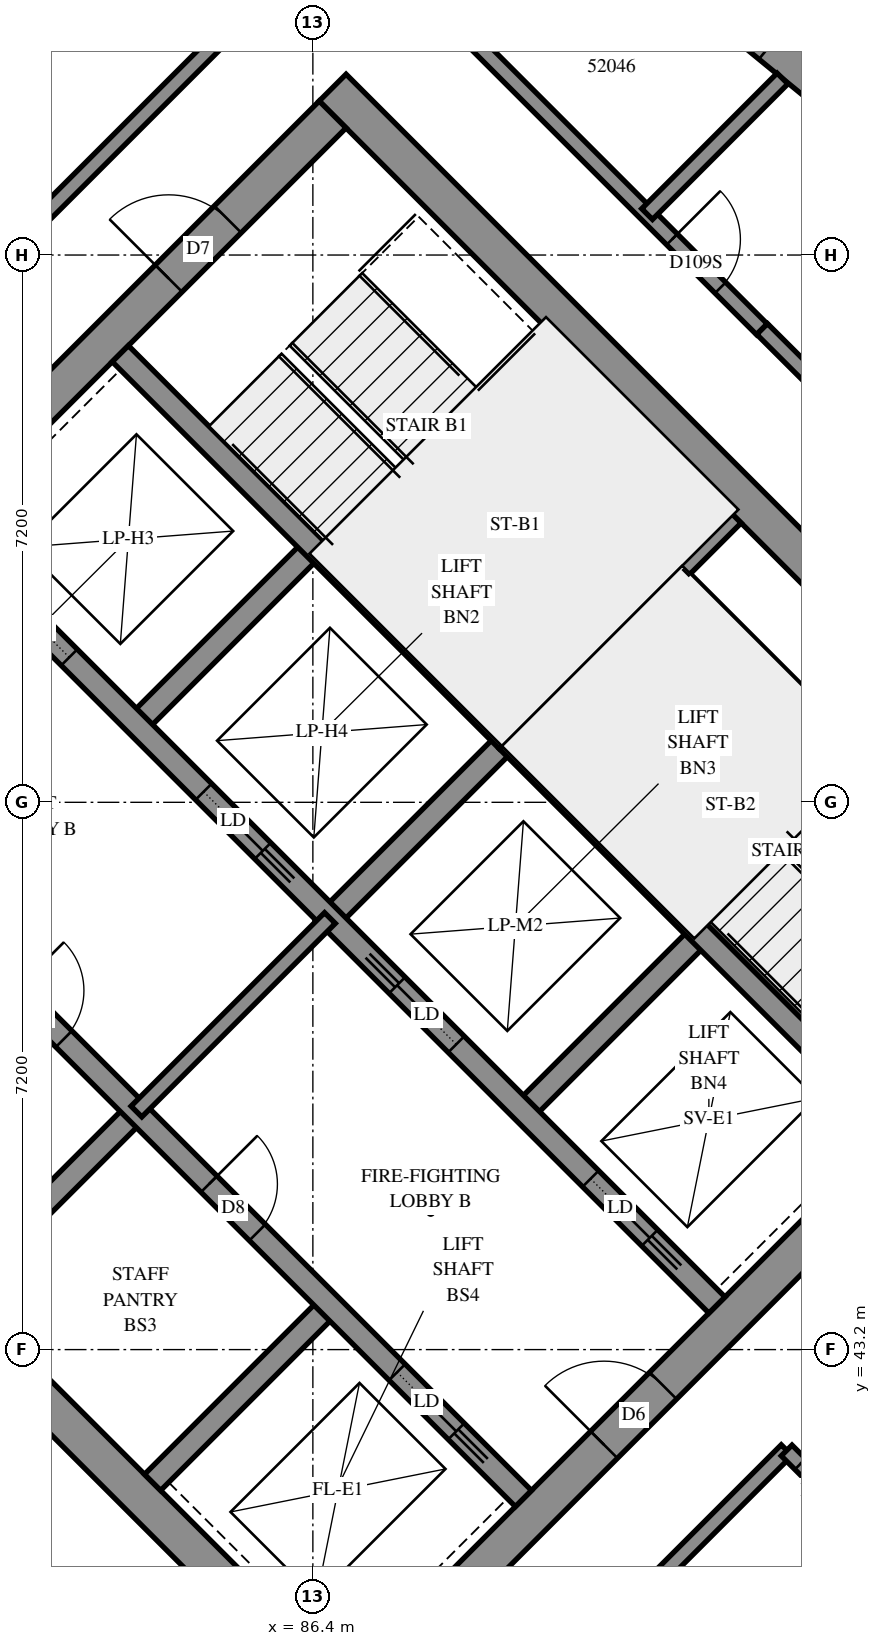
"""IFC4 building model, lengths in metres.
Left out: names, types, materials, properties, quantities, classifications, styles, units other than length and angle.
Written with IfcOpenShell. Run it as: python <this file> out.ifc"""

import sys

from ifc_helpers import new_model, si_unit, direction, frame, frame_2d, origin, place, context, subcontext, project, spatial, polyline, rectangle, outline, extrude, element, fill, save


model = new_model("IFC4")
c1 = context("Model", 3, precision=1e-05, world=origin(), true_north=direction((0.0, 1.0)))
c2 = subcontext(c1, "Body", "Model", "MODEL_VIEW")
j1 = project(units=[si_unit("LENGTHUNIT", "METRE"), si_unit("PLANEANGLEUNIT", "RADIAN")], contexts=[c1])
p1 = place(None, origin())
s1 = spatial("IfcSite", under=j1, at=p1, CompositionType="ELEMENT")
p2 = place(p1, origin())
s2 = spatial("IfcBuilding", under=s1, at=p2, CompositionType="ELEMENT")
p3 = place(p2, frame((0.0, 0.0, 193.0)))
s3 = spatial("IfcBuildingStorey", under=s2, at=p3, CompositionType="ELEMENT", Elevation=193.0)
p4 = place(p3, frame((76.124, 49.267, -0.3), z_axis=(0.0, 0.0, 1.0), x_axis=(0.7071067812, -0.7071067812, 0.0)))
e1 = element("IfcWall", 1, at=p4, inside=s3, PredefinedType="SHEAR", context=c2, shape_type="SweptSolid", body=[
    extrude(rectangle(XDim=15.4, YDim=0.5, at=frame_2d((7.7, 0.0))), origin(), (0.0, 0.0, 1.0), 2.7),
])
p5 = place(p3, frame((86.66, 59.802, -0.3), z_axis=(0.0, 0.0, 1.0), x_axis=(0.7071067812, -0.7071067812, 0.0)))
e2 = element("IfcWall", 2, at=p5, inside=s3, PredefinedType="SHEAR", context=c2, shape_type="SweptSolid", body=[
    extrude(rectangle(XDim=15.4, YDim=0.5, at=frame_2d((7.7, 0.0))), origin(), (0.0, 0.0, 1.0), 2.7),
])
p6 = place(p5, frame((10.5, 0.0, 0.3)))
e3 = element("IfcOpeningElement", 3, at=p6, cuts=e2, PredefinedType="OPENING", context=c2, shape_type="SweptSolid", body=[
    extrude(rectangle(XDim=0.8, YDim=2.1, at=frame_2d((0.4, 1.05))), frame((0.0, 0.26, 0.0), z_axis=(0.0, -1.0, 0.0), x_axis=(1.0, 0.0, 0.0)), (0.0, 0.0, 1.0), 0.52),
])
p7 = place(p3, frame((76.478, 49.267, -0.3), z_axis=(0.0, 0.0, 1.0), x_axis=(0.7071067812, 0.7071067812, 0.0)))
e4 = element("IfcWall", 4, at=p7, inside=s3, PredefinedType="SHEAR", context=c2, shape_type="SweptSolid", body=[
    extrude(rectangle(XDim=14.4, YDim=0.5, at=frame_2d((7.2, 0.0))), origin(), (0.0, 0.0, 1.0), 2.7),
])
p8 = place(p7, frame((4.55, 0.0, 0.3)))
e5 = element("IfcOpeningElement", 5, at=p8, cuts=e4, PredefinedType="OPENING", context=c2, shape_type="SweptSolid", body=[
    extrude(rectangle(XDim=1.1, YDim=2.1, at=frame_2d((0.55, 1.05))), frame((0.0, 0.26, 0.0), z_axis=(0.0, -1.0, 0.0), x_axis=(1.0, 0.0, 0.0)), (0.0, 0.0, 1.0), 0.52),
])
p9 = place(p7, frame((11.35, 0.0, 0.3)))
e6 = element("IfcOpeningElement", 6, at=p9, cuts=e4, PredefinedType="OPENING", context=c2, shape_type="SweptSolid", body=[
    extrude(rectangle(XDim=1.1, YDim=2.1, at=frame_2d((0.55, 1.05))), frame((0.0, 0.26, 0.0), z_axis=(0.0, -1.0, 0.0), x_axis=(1.0, 0.0, 0.0)), (0.0, 0.0, 1.0), 0.52),
])
p10 = place(p3, frame((87.013, 38.731, -0.3), z_axis=(0.0, 0.0, 1.0), x_axis=(0.7071067812, 0.7071067812, 0.0)))
e7 = element("IfcWall", 7, at=p10, inside=s3, PredefinedType="SHEAR", context=c2, shape_type="SweptSolid", body=[
    extrude(rectangle(XDim=14.4, YDim=0.5, at=frame_2d((7.2, 0.0))), origin(), (0.0, 0.0, 1.0), 2.7),
])
p11 = place(p10, frame((4.55, 0.0, 0.3)))
e8 = element("IfcOpeningElement", 8, at=p11, cuts=e7, PredefinedType="OPENING", context=c2, shape_type="SweptSolid", body=[
    extrude(rectangle(XDim=1.1, YDim=2.1, at=frame_2d((0.55, 1.05))), frame((0.0, 0.26, 0.0), z_axis=(0.0, -1.0, 0.0), x_axis=(1.0, 0.0, 0.0)), (0.0, 0.0, 1.0), 0.52),
])
p12 = place(p10, frame((11.35, 0.0, 0.3)))
e9 = element("IfcOpeningElement", 9, at=p12, cuts=e7, PredefinedType="OPENING", context=c2, shape_type="SweptSolid", body=[
    extrude(rectangle(XDim=1.1, YDim=2.1, at=frame_2d((0.55, 1.05))), frame((0.0, 0.26, 0.0), z_axis=(0.0, -1.0, 0.0), x_axis=(1.0, 0.0, 0.0)), (0.0, 0.0, 1.0), 0.52),
])
p13 = place(p3, frame((84.079, 51.423, 0.0), z_axis=(0.0, 0.0, 1.0), x_axis=(0.7071219326, 0.7070916295, 0.0)))
e10 = element("IfcWall", 10, at=p13, inside=s3, PredefinedType="SOLIDWALL", context=c2, shape_type="SweptSolid", body=[
    extrude(rectangle(XDim=3.3, YDim=0.3, at=frame_2d((1.65, 0.0))), origin(), (0.0, 0.0, 1.0), 3.1),
])
p14 = place(p3, frame((81.746, 43.999, 0.0), z_axis=(0.0, 0.0, 1.0), x_axis=(0.7071067812, 0.7071067812, 0.0)))
e11 = element("IfcWall", 11, at=p14, inside=s3, PredefinedType="SOLIDWALL", context=c2, shape_type="SweptSolid", body=[
    extrude(rectangle(XDim=3.3, YDim=0.3, at=frame_2d((1.65, 0.0))), origin(), (0.0, 0.0, 1.0), 3.1),
])
p15 = place(p3, frame((86.625, 48.878, 0.0), z_axis=(0.0, 0.0, 1.0), x_axis=(0.7071067812, 0.7071067812, 0.0)))
e12 = element("IfcWall", 12, at=p15, inside=s3, PredefinedType="SOLIDWALL", context=c2, shape_type="SweptSolid", body=[
    extrude(rectangle(XDim=3.3, YDim=0.3, at=frame_2d((1.65, 0.0))), origin(), (0.0, 0.0, 1.0), 3.1),
])
p16 = place(p3, frame((84.291, 41.453, 0.0), z_axis=(0.0, 0.0, 1.0), x_axis=(0.7071067812, 0.7071067812, 0.0)))
e13 = element("IfcWall", 13, at=p16, inside=s3, PredefinedType="SOLIDWALL", context=c2, shape_type="SweptSolid", body=[
    extrude(rectangle(XDim=3.3, YDim=0.3, at=frame_2d((1.65, 0.0))), origin(), (0.0, 0.0, 1.0), 3.1),
])
p17 = place(p3, frame((89.17, 46.332, 0.0), z_axis=(0.0, 0.0, 1.0), x_axis=(0.7071067812, 0.7071067812, 0.0)))
e14 = element("IfcWall", 14, at=p17, inside=s3, PredefinedType="SOLIDWALL", context=c2, shape_type="SweptSolid", body=[
    extrude(rectangle(XDim=3.3, YDim=0.3, at=frame_2d((1.65, 0.0))), origin(), (0.0, 0.0, 1.0), 3.1),
])
p18 = place(p3, frame((78.988, 51.423, 0.0), z_axis=(0.0, 0.0, 1.0), x_axis=(0.7071067812, -0.7071067812, 0.0)))
e15 = element("IfcWall", 15, at=p18, inside=s3, PredefinedType="SOLIDWALL", context=c2, shape_type="SweptSolid", body=[
    extrude(rectangle(XDim=14.4, YDim=0.3, at=frame_2d((7.2, 0.0))), origin(), (0.0, 0.0, 1.0), 3.1),
])
p19 = place(p18, frame((1.35, 0.0, 0.0)))
e16 = element("IfcOpeningElement", 16, at=p19, cuts=e15, PredefinedType="OPENING", context=c2, shape_type="SweptSolid", body=[
    extrude(rectangle(XDim=0.9, YDim=2.1, at=frame_2d((0.45, 1.05))), frame((0.0, 0.16, 0.0), z_axis=(0.0, -1.0, 0.0), x_axis=(1.0, 0.0, 0.0)), (0.0, 0.0, 1.0), 0.32),
])
p20 = place(p18, frame((4.95, 0.0, 0.0)))
e17 = element("IfcOpeningElement", 17, at=p20, cuts=e15, PredefinedType="OPENING", context=c2, shape_type="SweptSolid", body=[
    extrude(rectangle(XDim=0.9, YDim=2.1, at=frame_2d((0.45, 1.05))), frame((0.0, 0.16, 0.0), z_axis=(0.0, -1.0, 0.0), x_axis=(1.0, 0.0, 0.0)), (0.0, 0.0, 1.0), 0.32),
])
p21 = place(p18, frame((8.55, 0.0, 0.0)))
e18 = element("IfcOpeningElement", 18, at=p21, cuts=e15, PredefinedType="OPENING", context=c2, shape_type="SweptSolid", body=[
    extrude(rectangle(XDim=0.9, YDim=2.1, at=frame_2d((0.45, 1.05))), frame((0.0, 0.16, 0.0), z_axis=(0.0, -1.0, 0.0), x_axis=(1.0, 0.0, 0.0)), (0.0, 0.0, 1.0), 0.32),
])
p22 = place(p18, frame((12.05, 0.0, 0.0)))
e19 = element("IfcOpeningElement", 19, at=p22, cuts=e15, PredefinedType="OPENING", context=c2, shape_type="SweptSolid", body=[
    extrude(rectangle(XDim=1.1, YDim=2.1, at=frame_2d((0.55, 1.05))), frame((0.0, 0.16, 0.0), z_axis=(0.0, -1.0, 0.0), x_axis=(1.0, 0.0, 0.0)), (0.0, 0.0, 1.0), 0.32),
])
p23 = place(p3, frame((81.534, 53.969, 0.0), z_axis=(0.0, 0.0, 1.0), x_axis=(0.707103309, -0.7071102534, 0.0)))
e20 = element("IfcWall", 20, at=p23, inside=s3, PredefinedType="SOLIDWALL", context=c2, shape_type="SweptSolid", body=[
    extrude(rectangle(XDim=14.4, YDim=0.3, at=frame_2d((7.2, 0.0))), origin(), (0.0, 0.0, 1.0), 3.1),
])
p24 = place(p23, frame((1.25, 0.0, 0.0)))
e21 = element("IfcOpeningElement", 21, at=p24, cuts=e20, PredefinedType="OPENING", context=c2, shape_type="SweptSolid", body=[
    extrude(rectangle(XDim=1.1, YDim=2.1, at=frame_2d((0.55, 1.05))), frame((0.0, 0.16, 0.0), z_axis=(0.0, -1.0, 0.0), x_axis=(1.0, 0.0, 0.0)), (0.0, 0.0, 1.0), 0.32),
])
p25 = place(p23, frame((4.85, 0.0, 0.0)))
e22 = element("IfcOpeningElement", 22, at=p25, cuts=e20, PredefinedType="OPENING", context=c2, shape_type="SweptSolid", body=[
    extrude(rectangle(XDim=1.1, YDim=2.1, at=frame_2d((0.55, 1.05))), frame((0.0, 0.16, 0.0), z_axis=(0.0, -1.0, 0.0), x_axis=(1.0, 0.0, 0.0)), (0.0, 0.0, 1.0), 0.32),
])
p26 = place(p23, frame((8.45, 0.0, 0.0)))
e23 = element("IfcOpeningElement", 23, at=p26, cuts=e20, PredefinedType="OPENING", context=c2, shape_type="SweptSolid", body=[
    extrude(rectangle(XDim=1.1, YDim=2.1, at=frame_2d((0.55, 1.05))), frame((0.0, 0.16, 0.0), z_axis=(0.0, -1.0, 0.0), x_axis=(1.0, 0.0, 0.0)), (0.0, 0.0, 1.0), 0.32),
])
p27 = place(p23, frame((12.05, 0.0, 0.0)))
e24 = element("IfcOpeningElement", 24, at=p27, cuts=e20, PredefinedType="OPENING", context=c2, shape_type="SweptSolid", body=[
    extrude(rectangle(XDim=1.1, YDim=2.1, at=frame_2d((0.55, 1.05))), frame((0.0, 0.16, 0.0), z_axis=(0.0, -1.0, 0.0), x_axis=(1.0, 0.0, 0.0)), (0.0, 0.0, 1.0), 0.32),
])
for number, where, z_axis, x_axis in (
    (25, (83.867, 56.302, 0.0), (0.0, 0.0, 1.0), (0.707, -0.707, 0.0)),
    (26, (88.958, 51.211, 0.0), (0.0, 0.0, 1.0), (0.707, -0.707, 0.0)),
):
    element("IfcWall", number, at=place(p3, frame(where, z_axis=z_axis, x_axis=x_axis)), inside=s3, PredefinedType="SOLIDWALL", context=c2, shape_type="SweptSolid", body=[
        extrude(rectangle(XDim=7.2, YDim=0.3, at=frame_2d((3.6, 0.0))), origin(), (0.0, 0.0, 1.0), 3.1),
    ])
p28 = place(p3, frame((88.958, 51.211, 0.0), z_axis=(0.0, 0.0, 1.0), x_axis=(0.7071067812, 0.7071067812, 0.0)))
e27 = element("IfcWall", 27, at=p28, inside=s3, PredefinedType="SOLIDWALL", context=c2, shape_type="SweptSolid", body=[
    extrude(rectangle(XDim=4.2, YDim=0.3, at=frame_2d((2.1, 0.0))), origin(), (0.0, 0.0, 1.0), 3.1),
])
p29 = place(p3, frame((93.601, 59.408, 0.0), z_axis=(0.0, 0.0, 1.0), x_axis=(-0.7734255065, 0.6338872028, 0.0)))
e28 = element("IfcWall", 28, at=p29, inside=s3, PredefinedType="SOLIDWALL", context=c2, shape_type="SweptSolid", body=[
    extrude(outline(polyline([(-0.025, -0.25), (3.32, -0.25), (3.369, 0.25), (0.025, 0.25), (-0.025, -0.25)])), origin(), (0.0, 0.0, 1.0), 3.1),
])
p30 = place(p29, frame((1.518, 0.0, 0.45)))
e29 = element("IfcOpeningElement", 29, at=p30, cuts=e28, PredefinedType="OPENING", context=c2, shape_type="SweptSolid", body=[
    extrude(rectangle(XDim=1.2, YDim=2.5, at=frame_2d((0.6, 1.25))), frame((0.0, 0.26, 0.0), z_axis=(0.0, -1.0, 0.0), x_axis=(1.0, 0.0, 0.0)), (0.0, 0.0, 1.0), 0.52),
])
p31 = place(p3, frame((91.313, 53.354, 0.0), z_axis=(0.0, 0.0, 1.0), x_axis=(0.7071147811, -0.7070987812, 0.0)))
e30 = element("IfcWall", 30, at=p31, inside=s3, PredefinedType="PARTITIONING", context=c2, shape_type="SweptSolid", body=[
    extrude(rectangle(XDim=6.25, YDim=0.15, at=frame_2d((3.125, 0.0))), origin(), (0.0, 0.0, 1.0), 3.1),
])
p32 = place(p3, frame((84.079, 46.332, 0.0), z_axis=(0.0, 0.0, 1.0), x_axis=(0.7071067812, 0.7071067812, 0.0)))
e31 = element("IfcWall", 31, at=p32, inside=s3, PredefinedType="PARTITIONING", context=c2, shape_type="SweptSolid", body=[
    extrude(rectangle(XDim=3.6, YDim=0.2, at=frame_2d((1.8, 0.0))), origin(), (0.0, 0.0, 1.0), 3.1),
])
p33 = place(p3, frame((80.849, 58.377, 0.0), z_axis=(0.0, 0.0, 1.0), x_axis=(0.7071067812, 0.7071067812, 0.0)))
e32 = element("IfcWall", 32, at=p33, inside=s3, PredefinedType="PARTITIONING", context=c2, shape_type="SweptSolid", body=[
    extrude(rectangle(XDim=9.333, YDim=0.2, at=frame_2d((4.666, 0.0))), origin(), (0.0, 0.0, 1.0), 3.1),
])
p34 = place(p3, frame((86.835, 36.079, 0.0), z_axis=(0.0, 0.0, 1.0), x_axis=(0.7071067812, 0.7071067812, 0.0)))
e33 = element("IfcWall", 33, at=p34, inside=s3, PredefinedType="PARTITIONING", context=c2, shape_type="SweptSolid", body=[
    extrude(rectangle(XDim=8.2, YDim=0.2, at=frame_2d((4.1, 0.0))), origin(), (0.0, 0.0, 1.0), 3.1),
])
p35 = place(p3, frame((81.037, 56.303, 0.0), z_axis=(0.0, 0.0, 1.0), x_axis=(0.7071067812, 0.7071067812, 0.0)))
e34 = element("IfcWall", 34, at=p35, inside=s3, PredefinedType="PARTITIONING", context=c2, shape_type="SweptSolid", body=[
    extrude(rectangle(XDim=8.2, YDim=0.2, at=frame_2d((4.1, 0.0))), origin(), (0.0, 0.0, 1.0), 3.1),
])
p36 = place(p35, frame((0.592, 0.0, 0.0)))
e35 = element("IfcOpeningElement", 35, at=p36, cuts=e34, PredefinedType="OPENING", context=c2, shape_type="SweptSolid", body=[
    extrude(rectangle(XDim=1.0, YDim=2.1, at=frame_2d((0.5, 1.05))), frame((0.0, 0.11, 0.0), z_axis=(0.0, -1.0, 0.0), x_axis=(1.0, 0.0, 0.0)), (0.0, 0.0, 1.0), 0.22),
])
p37 = place(p3, frame((80.849, 42.061, 0.0), z_axis=(0.0, 0.0, 1.0), x_axis=(0.7071067812, -0.7071067812, 0.0)))
e36 = element("IfcWall", 36, at=p37, inside=s3, PredefinedType="PARTITIONING", context=c2, shape_type="SweptSolid", body=[
    extrude(rectangle(XDim=6.964, YDim=0.2, at=frame_2d((3.482, 0.0))), origin(), (0.0, 0.0, 1.0), 3.1),
])
p38 = place(p37, frame((5.159, 0.0, 0.0)))
e37 = element("IfcOpeningElement", 37, at=p38, cuts=e36, PredefinedType="OPENING", context=c2, shape_type="SweptSolid", body=[
    extrude(rectangle(XDim=0.9, YDim=2.1, at=frame_2d((0.45, 1.05))), frame((0.0, 0.11, 0.0), z_axis=(0.0, -1.0, 0.0), x_axis=(1.0, 0.0, 0.0)), (0.0, 0.0, 1.0), 0.22),
])
p39 = place(p3, frame((88.247, 60.683, 0.0), z_axis=(0.0, 0.0, 1.0), x_axis=(0.7071067812, -0.7071067812, 0.0)))
e38 = element("IfcWall", 38, at=p39, inside=s3, PredefinedType="PARTITIONING", context=c2, shape_type="SweptSolid", body=[
    extrude(rectangle(XDim=5.742, YDim=0.2, at=frame_2d((2.871, 0.0))), origin(), (0.0, 0.0, 1.0), 3.1),
])
p40 = place(p39, frame((4.069, 0.0, 0.0)))
e39 = element("IfcOpeningElement", 39, at=p40, cuts=e38, PredefinedType="OPENING", context=c2, shape_type="SweptSolid", body=[
    extrude(rectangle(XDim=0.9, YDim=2.1, at=frame_2d((0.45, 1.05))), frame((0.0, 0.11, 0.0), z_axis=(0.0, -1.0, 0.0), x_axis=(1.0, 0.0, 0.0)), (0.0, 0.0, 1.0), 0.22),
])
p41 = place(p3, frame((92.633, 41.873, 0.0), z_axis=(0.0, 0.0, 1.0), x_axis=(0.7071067812, -0.7071067812, 0.0)))
e40 = element("IfcWall", 40, at=p41, inside=s3, PredefinedType="PARTITIONING", context=c2, shape_type="SweptSolid", body=[
    extrude(rectangle(XDim=5.199, YDim=0.2, at=frame_2d((2.599, 0.0))), origin(), (0.0, 0.0, 1.0), 3.1),
])
p42 = place(p41, frame((0.253, 0.0, 0.0)))
e41 = element("IfcOpeningElement", 41, at=p42, cuts=e40, PredefinedType="OPENING", context=c2, shape_type="SweptSolid", body=[
    extrude(rectangle(XDim=1.0, YDim=2.1, at=frame_2d((0.5, 1.05))), frame((0.0, 0.11, 0.0), z_axis=(0.0, -1.0, 0.0), x_axis=(1.0, 0.0, 0.0)), (0.0, 0.0, 1.0), 0.22),
])
p43 = place(p41, frame((3.948, 0.0, 0.0)))
e42 = element("IfcOpeningElement", 42, at=p43, cuts=e40, PredefinedType="OPENING", context=c2, shape_type="SweptSolid", body=[
    extrude(rectangle(XDim=0.9, YDim=2.1, at=frame_2d((0.45, 1.05))), frame((0.0, 0.11, 0.0), z_axis=(0.0, -1.0, 0.0), x_axis=(1.0, 0.0, 0.0)), (0.0, 0.0, 1.0), 0.22),
])
p44 = place(p3, frame((90.797, 58.139, 0.0), z_axis=(0.0, 0.0, 1.0), x_axis=(0.7066702589, 0.7075430342, 0.0)))
e43 = element("IfcWall", 43, at=p44, inside=s3, PredefinedType="PARTITIONING", context=c2, shape_type="SweptSolid", body=[
    extrude(rectangle(XDim=2.521, YDim=0.2, at=frame_2d((1.26, 0.0))), origin(), (0.0, 0.0, 1.0), 3.1),
])
p45 = place(p3, frame((92.072, 39.046, 0.0), z_axis=(0.0, 0.0, 1.0), x_axis=(0.706689978, 0.7075233388, 0.0)))
e44 = element("IfcWall", 44, at=p45, inside=s3, PredefinedType="PARTITIONING", context=c2, shape_type="SweptSolid", body=[
    extrude(rectangle(XDim=2.4, YDim=0.15, at=frame_2d((1.2, 0.0))), origin(), (0.0, 0.0, 1.0), 3.1),
])
p46 = place(p3, frame((92.311, 56.627, 0.0), z_axis=(0.0, 0.0, 1.0), x_axis=(0.7077922938, -0.7064206033, 0.0)))
e45 = element("IfcWall", 45, at=p46, inside=s3, PredefinedType="PARTITIONING", context=c2, shape_type="SweptSolid", body=[
    extrude(rectangle(XDim=1.458, YDim=0.2, at=frame_2d((0.729, 0.0))), origin(), (0.0, 0.0, 1.0), 3.1),
])
p47 = place(p30, origin())
e46 = element("IfcWindow", 46, at=p47, inside=s3, PartitioningType="SINGLE_PANEL", PredefinedType="WINDOW", context=c2, shape_type="SweptSolid", body=[
    extrude(rectangle(XDim=1.2, YDim=2.5, at=frame_2d((0.6, 1.25))), frame((0.0, 0.18, 0.0), z_axis=(0.0, -1.0, 0.0), x_axis=(1.0, 0.0, 0.0)), (0.0, 0.0, 1.0), 0.06),
])
fill(e29, e46)
p48 = place(p11, origin())
e47 = element("IfcDoor", 47, at=p48, inside=s3, OperationType="DOUBLE_DOOR_SINGLE_SWING", PredefinedType="DOOR", context=c2, shape_type="SweptSolid", body=[
    extrude(rectangle(XDim=1.1, YDim=2.1, at=frame_2d((0.55, 1.05))), frame((0.0, 0.025, 0.0), z_axis=(0.0, -1.0, 0.0), x_axis=(1.0, 0.0, 0.0)), (0.0, 0.0, 1.0), 0.05),
])
fill(e8, e47)
p49 = place(p9, origin())
e48 = element("IfcDoor", 48, at=p49, inside=s3, OperationType="SINGLE_SWING_LEFT", PredefinedType="DOOR", context=c2, shape_type="SweptSolid", body=[
    extrude(rectangle(XDim=1.1, YDim=2.1, at=frame_2d((0.55, 1.05))), frame((0.0, 0.025, 0.0), z_axis=(0.0, -1.0, 0.0), x_axis=(1.0, 0.0, 0.0)), (0.0, 0.0, 1.0), 0.05),
])
fill(e6, e48)
p50 = place(p20, origin())
e49 = element("IfcDoor", 49, at=p50, inside=s3, OperationType="SINGLE_SWING_LEFT", PredefinedType="DOOR", context=c2, shape_type="SweptSolid", body=[
    extrude(rectangle(XDim=0.9, YDim=2.1, at=frame_2d((0.45, 1.05))), frame((0.0, 0.025, 0.0), z_axis=(0.0, -1.0, 0.0), x_axis=(1.0, 0.0, 0.0)), (0.0, 0.0, 1.0), 0.05),
])
fill(e17, e49)
p51 = place(p21, origin())
e50 = element("IfcDoor", 50, at=p51, inside=s3, OperationType="SINGLE_SWING_LEFT", PredefinedType="DOOR", context=c2, shape_type="SweptSolid", body=[
    extrude(rectangle(XDim=0.9, YDim=2.1, at=frame_2d((0.45, 1.05))), frame((0.0, 0.025, 0.0), z_axis=(0.0, -1.0, 0.0), x_axis=(1.0, 0.0, 0.0)), (0.0, 0.0, 1.0), 0.05),
])
fill(e18, e50)
p52 = place(p22, origin())
e51 = element("IfcDoor", 51, at=p52, inside=s3, OperationType="SLIDING_TO_RIGHT", PredefinedType="DOOR", context=c2, shape_type="SweptSolid", body=[
    extrude(rectangle(XDim=1.1, YDim=2.1, at=frame_2d((0.55, 1.05))), frame((0.0, 0.025, 0.0), z_axis=(0.0, -1.0, 0.0), x_axis=(1.0, 0.0, 0.0)), (0.0, 0.0, 1.0), 0.05),
])
fill(e19, e51)
p53 = place(p24, origin())
e52 = element("IfcDoor", 52, at=p53, inside=s3, OperationType="SLIDING_TO_LEFT", PredefinedType="DOOR", context=c2, shape_type="SweptSolid", body=[
    extrude(rectangle(XDim=1.1, YDim=2.1, at=frame_2d((0.55, 1.05))), frame((0.0, 0.025, 0.0), z_axis=(0.0, -1.0, 0.0), x_axis=(1.0, 0.0, 0.0)), (0.0, 0.0, 1.0), 0.05),
])
fill(e21, e52)
p54 = place(p25, origin())
e53 = element("IfcDoor", 53, at=p54, inside=s3, OperationType="SLIDING_TO_RIGHT", PredefinedType="DOOR", context=c2, shape_type="SweptSolid", body=[
    extrude(rectangle(XDim=1.1, YDim=2.1, at=frame_2d((0.55, 1.05))), frame((0.0, 0.025, 0.0), z_axis=(0.0, -1.0, 0.0), x_axis=(1.0, 0.0, 0.0)), (0.0, 0.0, 1.0), 0.05),
])
fill(e22, e53)
p55 = place(p26, origin())
e54 = element("IfcDoor", 54, at=p55, inside=s3, OperationType="SLIDING_TO_LEFT", PredefinedType="DOOR", context=c2, shape_type="SweptSolid", body=[
    extrude(rectangle(XDim=1.1, YDim=2.1, at=frame_2d((0.55, 1.05))), frame((0.0, 0.025, 0.0), z_axis=(0.0, -1.0, 0.0), x_axis=(1.0, 0.0, 0.0)), (0.0, 0.0, 1.0), 0.05),
])
fill(e23, e54)
p56 = place(p27, origin())
e55 = element("IfcDoor", 55, at=p56, inside=s3, OperationType="SLIDING_TO_RIGHT", PredefinedType="DOOR", context=c2, shape_type="SweptSolid", body=[
    extrude(rectangle(XDim=1.1, YDim=2.1, at=frame_2d((0.55, 1.05))), frame((0.0, 0.025, 0.0), z_axis=(0.0, -1.0, 0.0), x_axis=(1.0, 0.0, 0.0)), (0.0, 0.0, 1.0), 0.05),
])
fill(e24, e55)
p57 = place(p40, origin())
e56 = element("IfcDoor", 56, at=p57, inside=s3, OperationType="SINGLE_SWING_RIGHT", PredefinedType="DOOR", context=c2, shape_type="SweptSolid", body=[
    extrude(rectangle(XDim=0.9, YDim=2.1, at=frame_2d((0.45, 1.05))), frame((0.0, 0.025, 0.0), z_axis=(0.0, -1.0, 0.0), x_axis=(1.0, 0.0, 0.0)), (0.0, 0.0, 1.0), 0.05),
])
fill(e39, e56)
p58 = place(p42, origin())
e57 = element("IfcDoor", 57, at=p58, inside=s3, OperationType="SINGLE_SWING_RIGHT", PredefinedType="DOOR", context=c2, shape_type="SweptSolid", body=[
    extrude(rectangle(XDim=1.0, YDim=2.1, at=frame_2d((0.5, 1.05))), frame((0.0, 0.025, 0.0), z_axis=(0.0, -1.0, 0.0), x_axis=(1.0, 0.0, 0.0)), (0.0, 0.0, 1.0), 0.05),
])
fill(e41, e57)
save(model, sys.argv[1])
